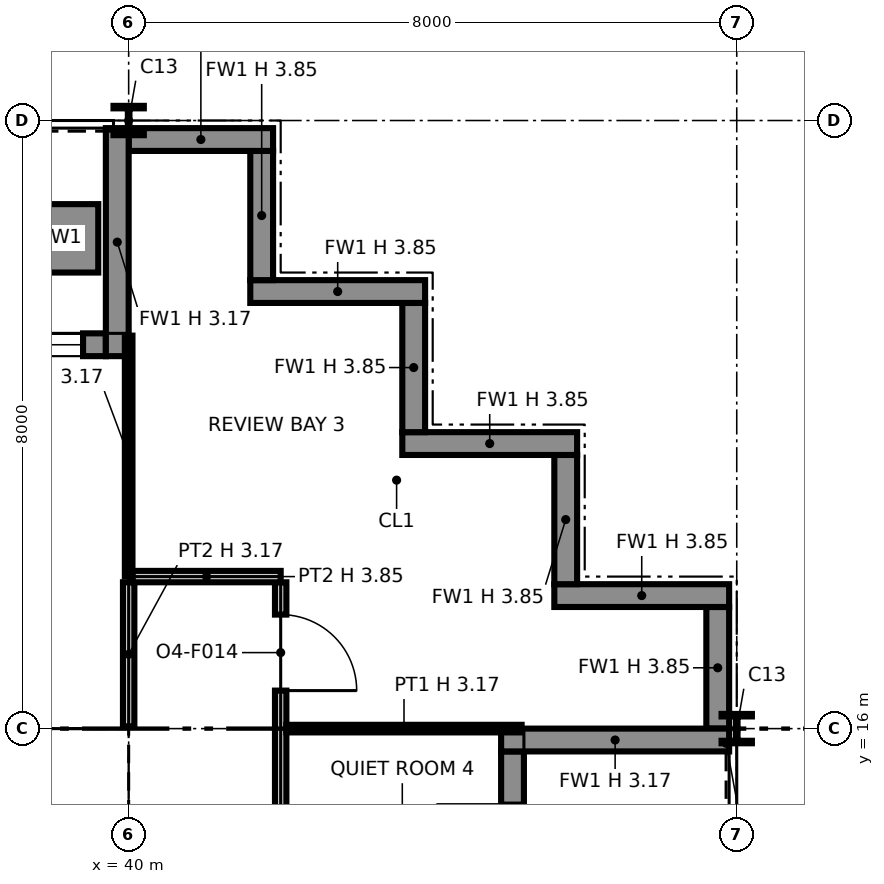
"""IFC4 building model, lengths in metres.
Left out: names, types, materials, properties, quantities, classifications, styles, units other than length and angle.
Written with IfcOpenShell. Run it as: python <this file> out.ifc"""

import sys

from ifc_helpers import new_model, si_unit, direction, frame, frame_2d, origin, origin_2d, place, context, subcontext, project, spatial, polyline, rectangle, i_section, outline, extrude, element, fill, save


model = new_model("IFC4")
c1 = context("Model", 3, precision=1e-05, world=origin(), true_north=direction((0.0, 1.0)))
c2 = subcontext(c1, "Body", "Model", "MODEL_VIEW")
j1 = project(units=[si_unit("LENGTHUNIT", "METRE"), si_unit("PLANEANGLEUNIT", "RADIAN")], contexts=[c1])
p1 = place(None, origin())
s1 = spatial("IfcSite", under=j1, at=p1, CompositionType="ELEMENT")
p2 = place(p1, origin())
s2 = spatial("IfcBuilding", under=s1, at=p2, CompositionType="ELEMENT")
p3 = place(p2, frame((0.0, 0.0, 217.0)))
s3 = spatial("IfcBuildingStorey", under=s2, at=p3, CompositionType="ELEMENT", Elevation=217.0)
p4 = place(p3, frame((40.0, 16.0, 0.0), z_axis=(0.0, 0.0, 1.0), x_axis=(1.0, 0.0, 0.0)))
e1 = element("IfcColumn", 1, at=p4, inside=s3, PredefinedType="COLUMN", context=c2, shape_type="SweptSolid", body=[
    extrude(i_section(OverallWidth=0.373, OverallDepth=0.368, WebThickness=0.015, FlangeThickness=0.024, at=origin_2d()), origin(), (0.0, 0.0, 1.0), 3.85),
])
for number, where, z_axis, x_axis in (
    (2, (40.0, 24.0, 0.0), (0.0, 0.0, 1.0), (1.0, 0.0, 0.0)),
    (3, (48.0, 16.0, 0.0), (0.0, 0.0, 1.0), (1.0, 0.0, 0.0)),
):
    element("IfcColumn", number, at=place(p3, frame(where, z_axis=z_axis, x_axis=x_axis)), inside=s3, PredefinedType="COLUMN", context=c2, shape_type="SweptSolid", body=[
        extrude(i_section(OverallWidth=0.399, OverallDepth=0.386, WebThickness=0.021, FlangeThickness=0.033, at=origin_2d()), origin(), (0.0, 0.0, 1.0), 3.85),
    ])
p5 = place(p3, frame((45.05, 8.3, 0.0), z_axis=(0.0, 0.0, 1.0), x_axis=(0.0, 1.0, 0.0)))
e4 = element("IfcWall", 4, at=p5, inside=s3, PredefinedType="SOLIDWALL", context=c2, shape_type="SweptSolid", body=[
    extrude(rectangle(XDim=7.4, YDim=0.3, at=frame_2d((3.7, 0.0))), origin(), (0.0, 0.0, 1.0), 3.85),
])
p6 = place(p5, frame((0.3, 0.0, 0.9)))
e5 = element("IfcOpeningElement", 5, at=p6, cuts=e4, PredefinedType="OPENING", context=c2, shape_type="SweptSolid", body=[
    extrude(rectangle(XDim=2.8, YDim=2.2, at=frame_2d((1.4, 1.1))), frame((0.0, 0.16, 0.0), z_axis=(0.0, -1.0, 0.0), x_axis=(1.0, 0.0, 0.0)), (0.0, 0.0, 1.0), 0.32),
])
p7 = place(p5, frame((4.7, 0.0, 0.0)))
e6 = element("IfcOpeningElement", 6, at=p7, cuts=e4, PredefinedType="OPENING", context=c2, shape_type="SweptSolid", body=[
    extrude(rectangle(XDim=2.0, YDim=2.4, at=frame_2d((1.0, 1.2))), frame((0.0, 0.16, 0.0), z_axis=(0.0, -1.0, 0.0), x_axis=(1.0, 0.0, 0.0)), (0.0, 0.0, 1.0), 0.32),
])
p8 = place(p3, frame((47.9, 15.85, 0.0), z_axis=(0.0, 0.0, 1.0), x_axis=(-1.0, 0.0, 0.0)))
e7 = element("IfcWall", 7, at=p8, inside=s3, PredefinedType="SOLIDWALL", context=c2, shape_type="SweptSolid", body=[
    extrude(rectangle(XDim=3.0, YDim=0.3, at=frame_2d((1.5, 0.0))), origin(), (0.0, 0.0, 1.0), 3.171),
])
p9 = place(p3, frame((47.75, 16.0, 0.0), z_axis=(0.0, 0.0, 1.0), x_axis=(0.0, 1.0, 0.0)))
e8 = element("IfcWall", 8, at=p9, inside=s3, PredefinedType="SOLIDWALL", context=c2, shape_type="SweptSolid", body=[
    extrude(rectangle(XDim=1.6, YDim=0.3, at=frame_2d((0.8, 0.0))), origin(), (0.0, 0.0, 1.0), 3.85),
])
p10 = place(p3, frame((47.9, 17.75, 0.0), z_axis=(0.0, 0.0, 1.0), x_axis=(-1.0, 0.0, 0.0)))
e9 = element("IfcWall", 9, at=p10, inside=s3, PredefinedType="SOLIDWALL", context=c2, shape_type="SweptSolid", body=[
    extrude(rectangle(XDim=2.3, YDim=0.3, at=frame_2d((1.15, 0.0))), origin(), (0.0, 0.0, 1.0), 3.85),
])
p11 = place(p3, frame((45.75, 17.9, 0.0), z_axis=(0.0, 0.0, 1.0), x_axis=(0.0, 1.0, 0.0)))
e10 = element("IfcWall", 10, at=p11, inside=s3, PredefinedType="SOLIDWALL", context=c2, shape_type="SweptSolid", body=[
    extrude(rectangle(XDim=1.7, YDim=0.3, at=frame_2d((0.85, 0.0))), origin(), (0.0, 0.0, 1.0), 3.85),
])
p12 = place(p3, frame((45.9, 19.75, 0.0), z_axis=(0.0, 0.0, 1.0), x_axis=(-1.0, 0.0, 0.0)))
e11 = element("IfcWall", 11, at=p12, inside=s3, PredefinedType="SOLIDWALL", context=c2, shape_type="SweptSolid", body=[
    extrude(rectangle(XDim=2.3, YDim=0.3, at=frame_2d((1.15, 0.0))), origin(), (0.0, 0.0, 1.0), 3.85),
])
p13 = place(p3, frame((43.75, 19.9, 0.0), z_axis=(0.0, 0.0, 1.0), x_axis=(0.0, 1.0, 0.0)))
e12 = element("IfcWall", 12, at=p13, inside=s3, PredefinedType="SOLIDWALL", context=c2, shape_type="SweptSolid", body=[
    extrude(rectangle(XDim=1.7, YDim=0.3, at=frame_2d((0.85, 0.0))), origin(), (0.0, 0.0, 1.0), 3.85),
])
p14 = place(p3, frame((43.9, 21.75, 0.0), z_axis=(0.0, 0.0, 1.0), x_axis=(-1.0, 0.0, 0.0)))
e13 = element("IfcWall", 13, at=p14, inside=s3, PredefinedType="SOLIDWALL", context=c2, shape_type="SweptSolid", body=[
    extrude(rectangle(XDim=2.3, YDim=0.3, at=frame_2d((1.15, 0.0))), origin(), (0.0, 0.0, 1.0), 3.85),
])
p15 = place(p3, frame((41.75, 21.9, 0.0), z_axis=(0.0, 0.0, 1.0), x_axis=(0.0, 1.0, 0.0)))
e14 = element("IfcWall", 14, at=p15, inside=s3, PredefinedType="SOLIDWALL", context=c2, shape_type="SweptSolid", body=[
    extrude(rectangle(XDim=1.7, YDim=0.3, at=frame_2d((0.85, 0.0))), origin(), (0.0, 0.0, 1.0), 3.85),
])
p16 = place(p3, frame((41.9, 23.75, 0.0), z_axis=(0.0, 0.0, 1.0), x_axis=(-1.0, 0.0, 0.0)))
e15 = element("IfcWall", 15, at=p16, inside=s3, PredefinedType="SOLIDWALL", context=c2, shape_type="SweptSolid", body=[
    extrude(rectangle(XDim=1.9, YDim=0.3, at=frame_2d((0.95, 0.0))), origin(), (0.0, 0.0, 1.0), 3.85),
])
p17 = place(p3, frame((39.7, 21.05, 0.0), z_axis=(0.0, 0.0, 1.0), x_axis=(-1.0, 0.0, 0.0)))
e16 = element("IfcWall", 16, at=p17, inside=s3, PredefinedType="SOLIDWALL", context=c2, shape_type="SweptSolid", body=[
    extrude(rectangle(XDim=7.4, YDim=0.3, at=frame_2d((3.7, 0.0))), origin(), (0.0, 0.0, 1.0), 3.85),
])
p18 = place(p17, frame((0.3, 0.0, 0.9)))
e17 = element("IfcOpeningElement", 17, at=p18, cuts=e16, PredefinedType="OPENING", context=c2, shape_type="SweptSolid", body=[
    extrude(rectangle(XDim=2.8, YDim=2.2, at=frame_2d((1.4, 1.1))), frame((0.0, 0.16, 0.0), z_axis=(0.0, -1.0, 0.0), x_axis=(1.0, 0.0, 0.0)), (0.0, 0.0, 1.0), 0.32),
])
p19 = place(p17, frame((4.7, 0.0, 0.0)))
e18 = element("IfcOpeningElement", 18, at=p19, cuts=e16, PredefinedType="OPENING", context=c2, shape_type="SweptSolid", body=[
    extrude(rectangle(XDim=2.0, YDim=2.4, at=frame_2d((1.0, 1.2))), frame((0.0, 0.16, 0.0), z_axis=(0.0, -1.0, 0.0), x_axis=(1.0, 0.0, 0.0)), (0.0, 0.0, 1.0), 0.32),
])
p20 = place(p3, frame((39.85, 23.9, 0.0), z_axis=(0.0, 0.0, 1.0), x_axis=(0.0, -1.0, 0.0)))
e19 = element("IfcWall", 19, at=p20, inside=s3, PredefinedType="SOLIDWALL", context=c2, shape_type="SweptSolid", body=[
    extrude(rectangle(XDim=3.0, YDim=0.3, at=frame_2d((1.5, 0.0))), origin(), (0.0, 0.0, 1.0), 3.171),
])
p21 = place(p3, frame((39.6, 22.45, 0.0), z_axis=(0.0, 0.0, 1.0), x_axis=(-1.0, 0.0, 0.0)))
e20 = element("IfcWall", 20, at=p21, inside=s3, PredefinedType="SOLIDWALL", context=c2, shape_type="SweptSolid", body=[
    extrude(rectangle(XDim=3.2, YDim=0.9, at=frame_2d((1.6, 0.0))), origin(), (0.0, 0.0, 1.0), 0.6),
])
p22 = place(p3, frame((24.65, 15.25, 0.0), z_axis=(0.0, 0.0, 1.0), x_axis=(1.0, 0.0, 0.0)))
e21 = element("IfcWall", 21, at=p22, inside=s3, PredefinedType="PARTITIONING", context=c2, shape_type="SweptSolid", body=[
    extrude(outline(polyline([(0.0, 0.0), (14.7, 0.0), (14.7, 3.85), (7.438, 3.85), (7.438, 3.308), (7.262, 3.308), (7.261, 3.85), (0.0, 3.85), (0.0, 0.0)])), frame((0.0, 0.1, 0.0), z_axis=(0.0, -1.0, 0.0), x_axis=(1.0, 0.0, 0.0)), (0.0, 0.0, 1.0), 0.2),
])
p23 = place(p22, frame((2.85, 0.0, 0.0)))
e22 = element("IfcOpeningElement", 22, at=p23, cuts=e21, PredefinedType="OPENING", context=c2, shape_type="SweptSolid", body=[
    extrude(rectangle(XDim=1.8, YDim=2.1, at=frame_2d((0.9, 1.05))), frame((0.0, 0.11, 0.0), z_axis=(0.0, -1.0, 0.0), x_axis=(1.0, 0.0, 0.0)), (0.0, 0.0, 1.0), 0.22),
])
p24 = place(p22, frame((9.95, 0.0, 0.0), z_axis=(0.0, 0.0, 1.0), x_axis=(-1.0, 0.0, 0.0)))
e23 = element("IfcOpeningElement", 23, at=p24, cuts=e21, PredefinedType="OPENING", context=c2, shape_type="SweptSolid", body=[
    extrude(rectangle(XDim=1.4, YDim=2.1, at=frame_2d((0.7, 1.05))), frame((0.0, 0.11, 0.0), z_axis=(0.0, -1.0, 0.0), x_axis=(1.0, 0.0, 0.0)), (0.0, 0.0, 1.0), 0.22),
])
p25 = place(p22, frame((13.4, 0.0, 0.0), z_axis=(0.0, 0.0, 1.0), x_axis=(-1.0, 0.0, 0.0)))
e24 = element("IfcOpeningElement", 24, at=p25, cuts=e21, PredefinedType="OPENING", context=c2, shape_type="SweptSolid", body=[
    extrude(rectangle(XDim=1.4, YDim=2.1, at=frame_2d((0.7, 1.05))), frame((0.0, 0.11, 0.0), z_axis=(0.0, -1.0, 0.0), x_axis=(1.0, 0.0, 0.0)), (0.0, 0.0, 1.0), 0.22),
])
p26 = place(p3, frame((39.25, 8.85, 0.0), z_axis=(0.0, 0.0, 1.0), x_axis=(0.0, 1.0, 0.0)))
e25 = element("IfcWall", 25, at=p26, inside=s3, PredefinedType="PARTITIONING", context=c2, shape_type="SweptSolid", body=[
    extrude(rectangle(XDim=6.3, YDim=0.2, at=frame_2d((3.15, 0.0))), origin(), (0.0, 0.0, 1.0), 3.85),
])
p27 = place(p3, frame((42.0, 6.0, 0.0), z_axis=(0.0, 0.0, 1.0), x_axis=(0.0, 1.0, 0.0)))
e26 = element("IfcWall", 26, at=p27, inside=s3, PredefinedType="PARTITIONING", context=c2, shape_type="SweptSolid", body=[
    extrude(outline(polyline([(0.0, 0.0), (11.925, 0.0), (11.925, 3.85), (10.3, 3.85), (10.298, 3.172), (9.702, 3.172), (9.7, 3.85), (6.3, 3.85), (6.298, 3.172), (5.702, 3.172), (5.7, 3.85), (2.3, 3.85), (2.298, 3.172), (1.702, 3.172), (1.7, 3.85), (0.0, 3.85), (0.0, 0.0)])), frame((0.0, 0.075, 0.0), z_axis=(0.0, -1.0, 0.0), x_axis=(1.0, 0.0, 0.0)), (0.0, 0.0, 1.0), 0.15),
])
p28 = place(p27, frame((4.5, 0.0, 0.0), z_axis=(0.0, 0.0, 1.0), x_axis=(-1.0, 0.0, 0.0)))
e27 = element("IfcOpeningElement", 27, at=p28, cuts=e26, PredefinedType="OPENING", context=c2, shape_type="SweptSolid", body=[
    extrude(rectangle(XDim=1.0, YDim=2.1, at=frame_2d((0.5, 1.05))), frame((0.0, 0.085, 0.0), z_axis=(0.0, -1.0, 0.0), x_axis=(1.0, 0.0, 0.0)), (0.0, 0.0, 1.0), 0.17),
])
p29 = place(p27, frame((8.5, 0.0, 0.0), z_axis=(0.0, 0.0, 1.0), x_axis=(-1.0, 0.0, 0.0)))
e28 = element("IfcOpeningElement", 28, at=p29, cuts=e26, PredefinedType="OPENING", context=c2, shape_type="SweptSolid", body=[
    extrude(rectangle(XDim=1.0, YDim=2.1, at=frame_2d((0.5, 1.05))), frame((0.0, 0.085, 0.0), z_axis=(0.0, -1.0, 0.0), x_axis=(1.0, 0.0, 0.0)), (0.0, 0.0, 1.0), 0.17),
])
p30 = place(p27, frame((11.5, 0.0, 0.0), z_axis=(0.0, 0.0, 1.0), x_axis=(-1.0, 0.0, 0.0)))
e29 = element("IfcOpeningElement", 29, at=p30, cuts=e26, PredefinedType="OPENING", context=c2, shape_type="SweptSolid", body=[
    extrude(rectangle(XDim=1.0, YDim=2.1, at=frame_2d((0.5, 1.05))), frame((0.0, 0.085, 0.0), z_axis=(0.0, -1.0, 0.0), x_axis=(1.0, 0.0, 0.0)), (0.0, 0.0, 1.0), 0.17),
])
p31 = place(p3, frame((42.075, 16.0, 0.0), z_axis=(0.0, 0.0, 1.0), x_axis=(1.0, 0.0, 0.0)))
e30 = element("IfcWall", 30, at=p31, inside=s3, PredefinedType="PARTITIONING", context=c2, shape_type="SweptSolid", body=[
    extrude(rectangle(XDim=3.095, YDim=0.1, at=frame_2d((1.547, 0.0))), origin(), (0.0, 0.0, 1.0), 3.172),
])
p32 = place(p3, frame((40.0, 16.03, 0.0), z_axis=(0.0, 0.0, 1.0), x_axis=(0.0, 1.0, 0.0)))
e31 = element("IfcWall", 31, at=p32, inside=s3, PredefinedType="PARTITIONING", context=c2, shape_type="SweptSolid", body=[
    extrude(rectangle(XDim=1.895, YDim=0.15, at=frame_2d((0.948, 0.0))), origin(), (0.0, 0.0, 1.0), 3.172),
])
p33 = place(p3, frame((40.05, 18.0, 0.0), z_axis=(0.0, 0.0, 1.0), x_axis=(1.0, 0.0, 0.0)))
e32 = element("IfcWall", 32, at=p33, inside=s3, PredefinedType="PARTITIONING", context=c2, shape_type="SweptSolid", body=[
    extrude(rectangle(XDim=1.95, YDim=0.15, at=frame_2d((0.975, 0.0))), origin(), (0.0, 0.0, 1.0), 3.85),
])
p34 = place(p3, frame((40.0, 18.0, 0.0), z_axis=(0.0, 0.0, 1.0), x_axis=(0.0, 1.0, 0.0)))
e33 = element("IfcWall", 33, at=p34, inside=s3, PredefinedType="PARTITIONING", context=c2, shape_type="SweptSolid", body=[
    extrude(rectangle(XDim=3.17, YDim=0.1, at=frame_2d((1.585, 0.0))), origin(), (0.0, 0.0, 1.0), 3.172),
])
p35 = place(p18, origin())
e34 = element("IfcWindow", 34, at=p35, inside=s3, PartitioningType="SINGLE_PANEL", PredefinedType="WINDOW", context=c2, shape_type="SweptSolid", body=[
    extrude(rectangle(XDim=2.8, YDim=2.2, at=frame_2d((1.4, 1.1))), frame((0.0, 0.03, 0.0), z_axis=(0.0, -1.0, 0.0), x_axis=(1.0, 0.0, 0.0)), (0.0, 0.0, 1.0), 0.06),
])
fill(e17, e34)
p36 = place(p30, origin())
e35 = element("IfcDoor", 35, at=p36, inside=s3, OperationType="SINGLE_SWING_RIGHT", PredefinedType="DOOR", context=c2, shape_type="SweptSolid", body=[
    extrude(rectangle(XDim=1.0, YDim=2.1, at=frame_2d((0.5, 1.05))), frame((0.0, 0.025, 0.0), z_axis=(0.0, -1.0, 0.0), x_axis=(1.0, 0.0, 0.0)), (0.0, 0.0, 1.0), 0.05),
])
fill(e29, e35)
save(model, sys.argv[1])
